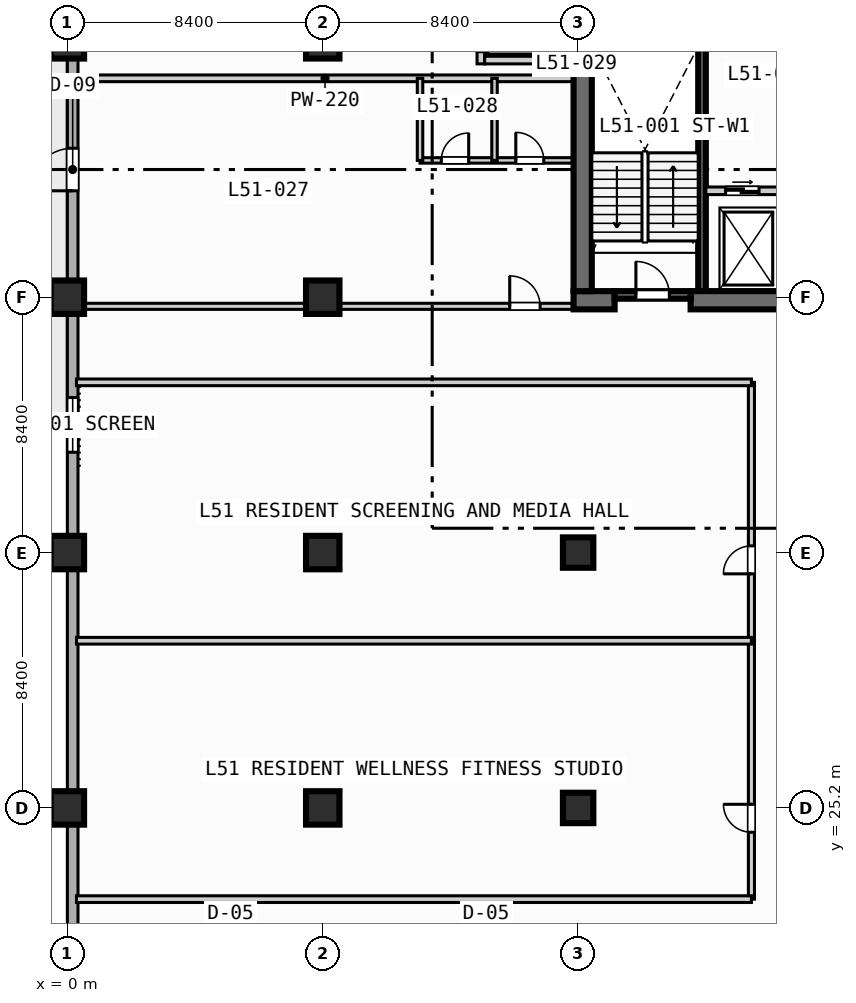
"""IFC4 building model, lengths in metres.
Left out: names, types, materials, properties, quantities, classifications, styles, units other than length and angle.
Written with IfcOpenShell. Run it as: python <this file> out.ifc"""

import sys

from ifc_helpers import new_model, si_unit, direction, frame, frame_2d, origin, origin_2d, place, context, subcontext, project, spatial, rectangle, extrude, element, fill, save


model = new_model("IFC4")
c1 = context("Model", 3, precision=1e-05, world=origin(), true_north=direction((0.0, 1.0)))
c2 = subcontext(c1, "Body", "Model", "MODEL_VIEW")
j1 = project(units=[si_unit("LENGTHUNIT", "METRE"), si_unit("PLANEANGLEUNIT", "RADIAN")], contexts=[c1])
p1 = place(None, origin())
s1 = spatial("IfcSite", under=j1, at=p1, CompositionType="ELEMENT")
p2 = place(p1, origin())
s2 = spatial("IfcBuilding", under=s1, at=p2, CompositionType="ELEMENT")
p3 = place(p2, frame((0.0, 0.0, 208.7)))
s3 = spatial("IfcBuildingStorey", under=s2, at=p3, CompositionType="ELEMENT", Elevation=208.7)
p4 = place(p3, frame((20.875, 42.2, 0.0), z_axis=(0.0, 0.0, 1.0), x_axis=(0.0, 1.0, 0.0)))
e1 = element("IfcWall", 1, at=p4, inside=s3, PredefinedType="SOLIDWALL", context=c2, shape_type="SweptSolid", body=[
    extrude(rectangle(XDim=8.05, YDim=0.25, at=frame_2d((4.025, 0.0))), origin(), (0.0, 0.0, 1.0), 3.47),
])
p5 = place(p3, frame((16.65, 41.9, 0.0), z_axis=(0.0, 0.0, 1.0), x_axis=(1.0, 0.0, 0.0)))
e2 = element("IfcWall", 2, at=p5, inside=s3, PredefinedType="SHEAR", context=c2, shape_type="SweptSolid", body=[
    extrude(rectangle(XDim=1.35, YDim=0.6, at=frame_2d((0.675, 0.0))), origin(), (0.0, 0.0, 1.0), 3.47),
])
p6 = place(p3, frame((20.5, 41.9, 0.0), z_axis=(0.0, 0.0, 1.0), x_axis=(1.0, 0.0, 0.0)))
e3 = element("IfcWall", 3, at=p6, inside=s3, PredefinedType="SHEAR", context=c2, shape_type="SweptSolid", body=[
    extrude(rectangle(XDim=5.0, YDim=0.6, at=frame_2d((2.5, 0.0))), origin(), (0.0, 0.0, 1.0), 3.47),
])
p7 = place(p3, frame((16.95, 42.2, 0.0), z_axis=(0.0, 0.0, 1.0), x_axis=(0.0, 1.0, 0.0)))
e4 = element("IfcWall", 4, at=p7, inside=s3, PredefinedType="SHEAR", context=c2, shape_type="SweptSolid", body=[
    extrude(rectangle(XDim=16.35, YDim=0.6, at=frame_2d((8.175, 0.0))), origin(), (0.0, 0.0, 1.0), 3.47),
])
for number, where, z_axis, x_axis in (
    (5, (0.0, 25.2, 0.0), (0.0, 0.0, 1.0), (1.0, 0.0, 0.0)),
    (6, (0.0, 33.6, 0.0), (0.0, 0.0, 1.0), (1.0, 0.0, 0.0)),
    (7, (0.0, 42.0, 0.0), (0.0, 0.0, 1.0), (1.0, 0.0, 0.0)),
    (8, (0.0, 50.4, 0.0), (0.0, 0.0, 1.0), (1.0, 0.0, 0.0)),
    (9, (8.4, 25.2, 0.0), (0.0, 0.0, 1.0), (1.0, 0.0, 0.0)),
    (10, (8.4, 33.6, 0.0), (0.0, 0.0, 1.0), (1.0, 0.0, 0.0)),
    (11, (8.4, 42.0, 0.0), (0.0, 0.0, 1.0), (1.0, 0.0, 0.0)),
    (12, (8.4, 50.4, 0.0), (0.0, 0.0, 1.0), (1.0, 0.0, 0.0)),
):
    element("IfcColumn", number, at=place(p3, frame(where, z_axis=z_axis, x_axis=x_axis)), inside=s3, PredefinedType="COLUMN", context=c2, shape_type="SweptSolid", body=[
        extrude(rectangle(XDim=1.1, YDim=1.1, at=origin_2d()), origin(), (0.0, 0.0, 1.0), 3.7),
    ])
for number, where, z_axis, x_axis in (
    (13, (16.8, 25.2, 0.0), (0.0, 0.0, 1.0), (1.0, 0.0, 0.0)),
    (14, (16.8, 33.6, 0.0), (0.0, 0.0, 1.0), (1.0, 0.0, 0.0)),
):
    element("IfcColumn", number, at=place(p3, frame(where, z_axis=z_axis, x_axis=x_axis)), inside=s3, PredefinedType="COLUMN", context=c2, shape_type="SweptSolid", body=[
        extrude(rectangle(XDim=1.0, YDim=1.0, at=origin_2d()), origin(), (0.0, 0.0, 1.0), 3.7),
    ])
p8 = place(p3, frame((0.175, 3.175, 0.0), z_axis=(0.0, 0.0, 1.0), x_axis=(0.0, 1.0, 0.0)))
e15 = element("IfcWall", 15, at=p8, inside=s3, PredefinedType="STANDARD", context=c2, shape_type="SweptSolid", body=[
    extrude(rectangle(XDim=69.25, YDim=0.35, at=frame_2d((34.625, 0.0))), origin(), (0.0, 0.0, 1.0), 3.47),
])
p9 = place(p8, frame((42.325, 0.0, 0.0)))
e16 = element("IfcOpeningElement", 16, at=p9, cuts=e15, PredefinedType="OPENING", context=c2, shape_type="SweptSolid", body=[
    extrude(rectangle(XDim=1.4, YDim=2.2, at=frame_2d((0.7, 1.1))), frame((0.0, 0.185, 0.0), z_axis=(0.0, -1.0, 0.0), x_axis=(1.0, 0.0, 0.0)), (0.0, 0.0, 1.0), 0.37),
])
p10 = place(p8, frame((33.725, 0.0, 0.85)))
e17 = element("IfcOpeningElement", 17, at=p10, cuts=e15, PredefinedType="OPENING", context=c2, shape_type="SweptSolid", body=[
    extrude(rectangle(XDim=1.8, YDim=1.8, at=frame_2d((0.9, 0.9))), frame((0.0, 0.185, 0.0), z_axis=(0.0, -1.0, 0.0), x_axis=(1.0, 0.0, 0.0)), (0.0, 0.0, 1.0), 0.37),
])
p11 = place(p3, frame((18.0, 42.075, 0.0), z_axis=(0.0, 0.0, 1.0), x_axis=(1.0, 0.0, 0.0)))
e18 = element("IfcWall", 18, at=p11, inside=s3, PredefinedType="SOLIDWALL", context=c2, shape_type="SweptSolid", body=[
    extrude(rectangle(XDim=2.5, YDim=0.25, at=frame_2d((1.25, 0.0))), origin(), (0.0, 0.0, 1.0), 3.47),
])
p12 = place(p11, frame((0.7, 0.0, 0.0)))
e19 = element("IfcOpeningElement", 19, at=p12, cuts=e18, PredefinedType="OPENING", context=c2, shape_type="SweptSolid", body=[
    extrude(rectangle(XDim=1.1, YDim=2.15, at=frame_2d((0.55, 1.075))), frame((0.0, 0.135, 0.0), z_axis=(0.0, -1.0, 0.0), x_axis=(1.0, 0.0, 0.0)), (0.0, 0.0, 1.0), 0.27),
])
p13 = place(p3, frame((21.0, 45.5, 0.0), z_axis=(0.0, 0.0, 1.0), x_axis=(1.0, 0.0, 0.0)))
e20 = element("IfcWall", 20, at=p13, inside=s3, PredefinedType="SOLIDWALL", context=c2, shape_type="SweptSolid", body=[
    extrude(rectangle(XDim=4.15, YDim=0.25, at=frame_2d((2.075, 0.0))), origin(), (0.0, 0.0, 1.0), 3.47),
])
p14 = place(p13, frame((0.65, 0.0, 0.0)))
e21 = element("IfcOpeningElement", 21, at=p14, cuts=e20, PredefinedType="OPENING", context=c2, shape_type="SweptSolid", body=[
    extrude(rectangle(XDim=1.1, YDim=2.15, at=frame_2d((0.55, 1.075))), frame((0.0, 0.135, 0.0), z_axis=(0.0, -1.0, 0.0), x_axis=(1.0, 0.0, 0.0)), (0.0, 0.0, 1.0), 0.27),
])
p15 = place(p3, frame((13.6, 49.675, 0.0), z_axis=(0.0, 0.0, 1.0), x_axis=(0.0, 1.0, 0.0)))
e22 = element("IfcWall", 22, at=p15, inside=s3, PredefinedType="SOLIDWALL", context=c2, shape_type="SweptSolid", body=[
    extrude(rectangle(XDim=2.75, YDim=0.25, at=frame_2d((1.375, 0.0))), origin(), (0.0, 0.0, 1.0), 3.47),
])
p16 = place(p15, frame((0.4, 0.0, 0.0)))
e23 = element("IfcOpeningElement", 23, at=p16, cuts=e22, PredefinedType="OPENING", context=c2, shape_type="SweptSolid", body=[
    extrude(rectangle(XDim=1.1, YDim=2.15, at=frame_2d((0.55, 1.075))), frame((0.0, 0.135, 0.0), z_axis=(0.0, -1.0, 0.0), x_axis=(1.0, 0.0, 0.0)), (0.0, 0.0, 1.0), 0.27),
])
p17 = place(p3, frame((15.6, 49.675, 0.0), z_axis=(0.0, 0.0, 1.0), x_axis=(0.0, 1.0, 0.0)))
e24 = element("IfcWall", 24, at=p17, inside=s3, PredefinedType="SOLIDWALL", context=c2, shape_type="SweptSolid", body=[
    extrude(rectangle(XDim=2.75, YDim=0.25, at=frame_2d((1.375, 0.0))), origin(), (0.0, 0.0, 1.0), 3.47),
])
p18 = place(p3, frame((13.725, 49.8, 0.0), z_axis=(0.0, 0.0, 1.0), x_axis=(1.0, 0.0, 0.0)))
e25 = element("IfcWall", 25, at=p18, inside=s3, PredefinedType="SOLIDWALL", context=c2, shape_type="SweptSolid", body=[
    extrude(rectangle(XDim=1.75, YDim=0.25, at=frame_2d((0.875, 0.0))), origin(), (0.0, 0.0, 1.0), 3.47),
])
p19 = place(p3, frame((0.35, 41.7, 0.0), z_axis=(0.0, 0.0, 1.0), x_axis=(1.0, 0.0, 0.0)))
e26 = element("IfcWall", 26, at=p19, inside=s3, PredefinedType="PARTITIONING", context=c2, shape_type="SweptSolid", body=[
    extrude(rectangle(XDim=16.25, YDim=0.2, at=frame_2d((8.125, 0.0))), origin(), (0.0, 0.0, 1.0), 2.82),
])
p20 = place(p19, frame((14.2, 0.0, 0.0)))
e27 = element("IfcOpeningElement", 27, at=p20, cuts=e26, PredefinedType="OPENING", context=c2, shape_type="SweptSolid", body=[
    extrude(rectangle(XDim=1.0, YDim=2.15, at=frame_2d((0.5, 1.075))), frame((0.0, 0.11, 0.0), z_axis=(0.0, -1.0, 0.0), x_axis=(1.0, 0.0, 0.0)), (0.0, 0.0, 1.0), 0.22),
])
p21 = place(p3, frame((0.35, 49.2, 0.0), z_axis=(0.0, 0.0, 1.0), x_axis=(1.0, 0.0, 0.0)))
e28 = element("IfcWall", 28, at=p21, inside=s3, PredefinedType="PARTITIONING", context=c2, shape_type="SweptSolid", body=[
    extrude(rectangle(XDim=16.25, YDim=0.22, at=frame_2d((8.125, 0.0))), origin(), (0.0, 0.0, 1.0), 3.47),
])
p22 = place(p3, frame((11.6, 46.5, 0.0), z_axis=(0.0, 0.0, 1.0), x_axis=(1.0, 0.0, 0.0)))
e29 = element("IfcWall", 29, at=p22, inside=s3, PredefinedType="PLUMBINGWALL", context=c2, shape_type="SweptSolid", body=[
    extrude(rectangle(XDim=5.0, YDim=0.18, at=frame_2d((2.5, 0.0))), origin(), (0.0, 0.0, 1.0), 3.47),
])
p23 = place(p22, frame((0.7, 0.0, 0.0)))
e30 = element("IfcOpeningElement", 30, at=p23, cuts=e29, PredefinedType="OPENING", context=c2, shape_type="SweptSolid", body=[
    extrude(rectangle(XDim=0.9, YDim=2.1, at=frame_2d((0.45, 1.05))), frame((0.0, 0.1, 0.0), z_axis=(0.0, -1.0, 0.0), x_axis=(1.0, 0.0, 0.0)), (0.0, 0.0, 1.0), 0.2),
])
p24 = place(p22, frame((3.15, 0.0, 0.0)))
e31 = element("IfcOpeningElement", 31, at=p24, cuts=e29, PredefinedType="OPENING", context=c2, shape_type="SweptSolid", body=[
    extrude(rectangle(XDim=0.92, YDim=2.1, at=frame_2d((0.46, 1.05))), frame((0.0, 0.1, 0.0), z_axis=(0.0, -1.0, 0.0), x_axis=(1.0, 0.0, 0.0)), (0.0, 0.0, 1.0), 0.2),
])
for number, where, z_axis, x_axis in (
    (32, (11.6, 46.5, 0.0), (0.0, 0.0, 1.0), (0.0, 1.0, 0.0)),
    (33, (14.05, 46.5, 0.0), (0.0, 0.0, 1.0), (0.0, 1.0, 0.0)),
):
    element("IfcWall", number, at=place(p3, frame(where, z_axis=z_axis, x_axis=x_axis)), inside=s3, PredefinedType="PLUMBINGWALL", context=c2, shape_type="SweptSolid", body=[
        extrude(rectangle(XDim=2.7, YDim=0.18, at=frame_2d((1.35, 0.0))), origin(), (0.0, 0.0, 1.0), 3.47),
    ])
p25 = place(p3, frame((22.5, 22.2, 0.0), z_axis=(0.0, 0.0, 1.0), x_axis=(0.0, 1.0, 0.0)))
e34 = element("IfcWall", 34, at=p25, inside=s3, PredefinedType="PARTITIONING", context=c2, shape_type="SweptSolid", body=[
    extrude(rectangle(XDim=17.0, YDim=0.2, at=frame_2d((8.5, 0.0))), origin(), (0.0, 0.0, 1.0), 3.47),
])
p26 = place(p25, frame((2.2, 0.0, 0.0)))
e35 = element("IfcOpeningElement", 35, at=p26, cuts=e34, PredefinedType="OPENING", context=c2, shape_type="SweptSolid", body=[
    extrude(rectangle(XDim=0.92, YDim=2.1, at=frame_2d((0.46, 1.05))), frame((0.0, 0.11, 0.0), z_axis=(0.0, -1.0, 0.0), x_axis=(1.0, 0.0, 0.0)), (0.0, 0.0, 1.0), 0.22),
])
p27 = place(p25, frame((10.7, 0.0, 0.0)))
e36 = element("IfcOpeningElement", 36, at=p27, cuts=e34, PredefinedType="OPENING", context=c2, shape_type="SweptSolid", body=[
    extrude(rectangle(XDim=0.92, YDim=2.1, at=frame_2d((0.46, 1.05))), frame((0.0, 0.11, 0.0), z_axis=(0.0, -1.0, 0.0), x_axis=(1.0, 0.0, 0.0)), (0.0, 0.0, 1.0), 0.22),
])
for number, where, z_axis, x_axis in (
    (37, (0.3, 22.2, 0.0), (0.0, 0.0, 1.0), (1.0, 0.0, 0.0)),
    (38, (0.3, 30.7, 0.0), (0.0, 0.0, 1.0), (1.0, 0.0, 0.0)),
    (39, (0.3, 39.2, 0.0), (0.0, 0.0, 1.0), (1.0, 0.0, 0.0)),
):
    element("IfcWall", number, at=place(p3, frame(where, z_axis=z_axis, x_axis=x_axis)), inside=s3, PredefinedType="PARTITIONING", context=c2, shape_type="SweptSolid", body=[
        extrude(rectangle(XDim=22.2, YDim=0.22, at=frame_2d((11.1, 0.0))), origin(), (0.0, 0.0, 1.0), 3.47),
    ])
p28 = place(p9, origin())
e40 = element("IfcDoor", 40, at=p28, inside=s3, OperationType="SINGLE_SWING_LEFT", PredefinedType="DOOR", context=c2, shape_type="SweptSolid", body=[
    extrude(rectangle(XDim=1.4, YDim=2.2, at=frame_2d((0.7, 1.1))), frame((0.0, 0.025, 0.0), z_axis=(0.0, -1.0, 0.0), x_axis=(1.0, 0.0, 0.0)), (0.0, 0.0, 1.0), 0.05),
])
fill(e16, e40)
p29 = place(p10, origin())
e41 = element("IfcWindow", 41, at=p29, inside=s3, PartitioningType="SINGLE_PANEL", PredefinedType="WINDOW", context=c2, shape_type="SweptSolid", body=[
    extrude(rectangle(XDim=1.8, YDim=1.8, at=frame_2d((0.9, 0.9))), frame((0.0, 0.03, 0.0), z_axis=(0.0, -1.0, 0.0), x_axis=(1.0, 0.0, 0.0)), (0.0, 0.0, 1.0), 0.06),
])
fill(e17, e41)
p30 = place(p12, origin())
e42 = element("IfcDoor", 42, at=p30, inside=s3, OperationType="SINGLE_SWING_LEFT", PredefinedType="DOOR", context=c2, shape_type="SweptSolid", body=[
    extrude(rectangle(XDim=1.1, YDim=2.15, at=frame_2d((0.55, 1.075))), frame((0.0, 0.025, 0.0), z_axis=(0.0, -1.0, 0.0), x_axis=(1.0, 0.0, 0.0)), (0.0, 0.0, 1.0), 0.05),
])
fill(e19, e42)
p31 = place(p14, origin())
e43 = element("IfcDoor", 43, at=p31, inside=s3, OperationType="SLIDING_TO_LEFT", PredefinedType="DOOR", context=c2, shape_type="SweptSolid", body=[
    extrude(rectangle(XDim=1.1, YDim=2.15, at=frame_2d((0.55, 1.075))), frame((0.0, 0.025, 0.0), z_axis=(0.0, -1.0, 0.0), x_axis=(1.0, 0.0, 0.0)), (0.0, 0.0, 1.0), 0.05),
])
fill(e21, e43)
p32 = place(p20, origin())
e44 = element("IfcDoor", 44, at=p32, inside=s3, OperationType="SINGLE_SWING_LEFT", PredefinedType="DOOR", context=c2, shape_type="SweptSolid", body=[
    extrude(rectangle(XDim=1.0, YDim=2.15, at=frame_2d((0.5, 1.075))), frame((0.0, 0.025, 0.0), z_axis=(0.0, -1.0, 0.0), x_axis=(1.0, 0.0, 0.0)), (0.0, 0.0, 1.0), 0.05),
])
fill(e27, e44)
p33 = place(p23, origin())
e45 = element("IfcDoor", 45, at=p33, inside=s3, OperationType="SINGLE_SWING_RIGHT", PredefinedType="DOOR", context=c2, shape_type="SweptSolid", body=[
    extrude(rectangle(XDim=0.9, YDim=2.1, at=frame_2d((0.45, 1.05))), frame((0.0, 0.025, 0.0), z_axis=(0.0, -1.0, 0.0), x_axis=(1.0, 0.0, 0.0)), (0.0, 0.0, 1.0), 0.05),
])
fill(e30, e45)
p34 = place(p24, origin())
e46 = element("IfcDoor", 46, at=p34, inside=s3, OperationType="SINGLE_SWING_LEFT", PredefinedType="DOOR", context=c2, shape_type="SweptSolid", body=[
    extrude(rectangle(XDim=0.92, YDim=2.1, at=frame_2d((0.46, 1.05))), frame((0.0, 0.025, 0.0), z_axis=(0.0, -1.0, 0.0), x_axis=(1.0, 0.0, 0.0)), (0.0, 0.0, 1.0), 0.05),
])
fill(e31, e46)
p35 = place(p26, origin())
e47 = element("IfcDoor", 47, at=p35, inside=s3, OperationType="SINGLE_SWING_RIGHT", PredefinedType="DOOR", context=c2, shape_type="SweptSolid", body=[
    extrude(rectangle(XDim=0.92, YDim=2.1, at=frame_2d((0.46, 1.05))), frame((0.0, 0.025, 0.0), z_axis=(0.0, -1.0, 0.0), x_axis=(1.0, 0.0, 0.0)), (0.0, 0.0, 1.0), 0.05),
])
fill(e35, e47)
p36 = place(p27, origin())
e48 = element("IfcDoor", 48, at=p36, inside=s3, OperationType="SINGLE_SWING_LEFT", PredefinedType="DOOR", context=c2, shape_type="SweptSolid", body=[
    extrude(rectangle(XDim=0.92, YDim=2.1, at=frame_2d((0.46, 1.05))), frame((0.0, 0.025, 0.0), z_axis=(0.0, -1.0, 0.0), x_axis=(1.0, 0.0, 0.0)), (0.0, 0.0, 1.0), 0.05),
])
fill(e36, e48)
save(model, sys.argv[1])
